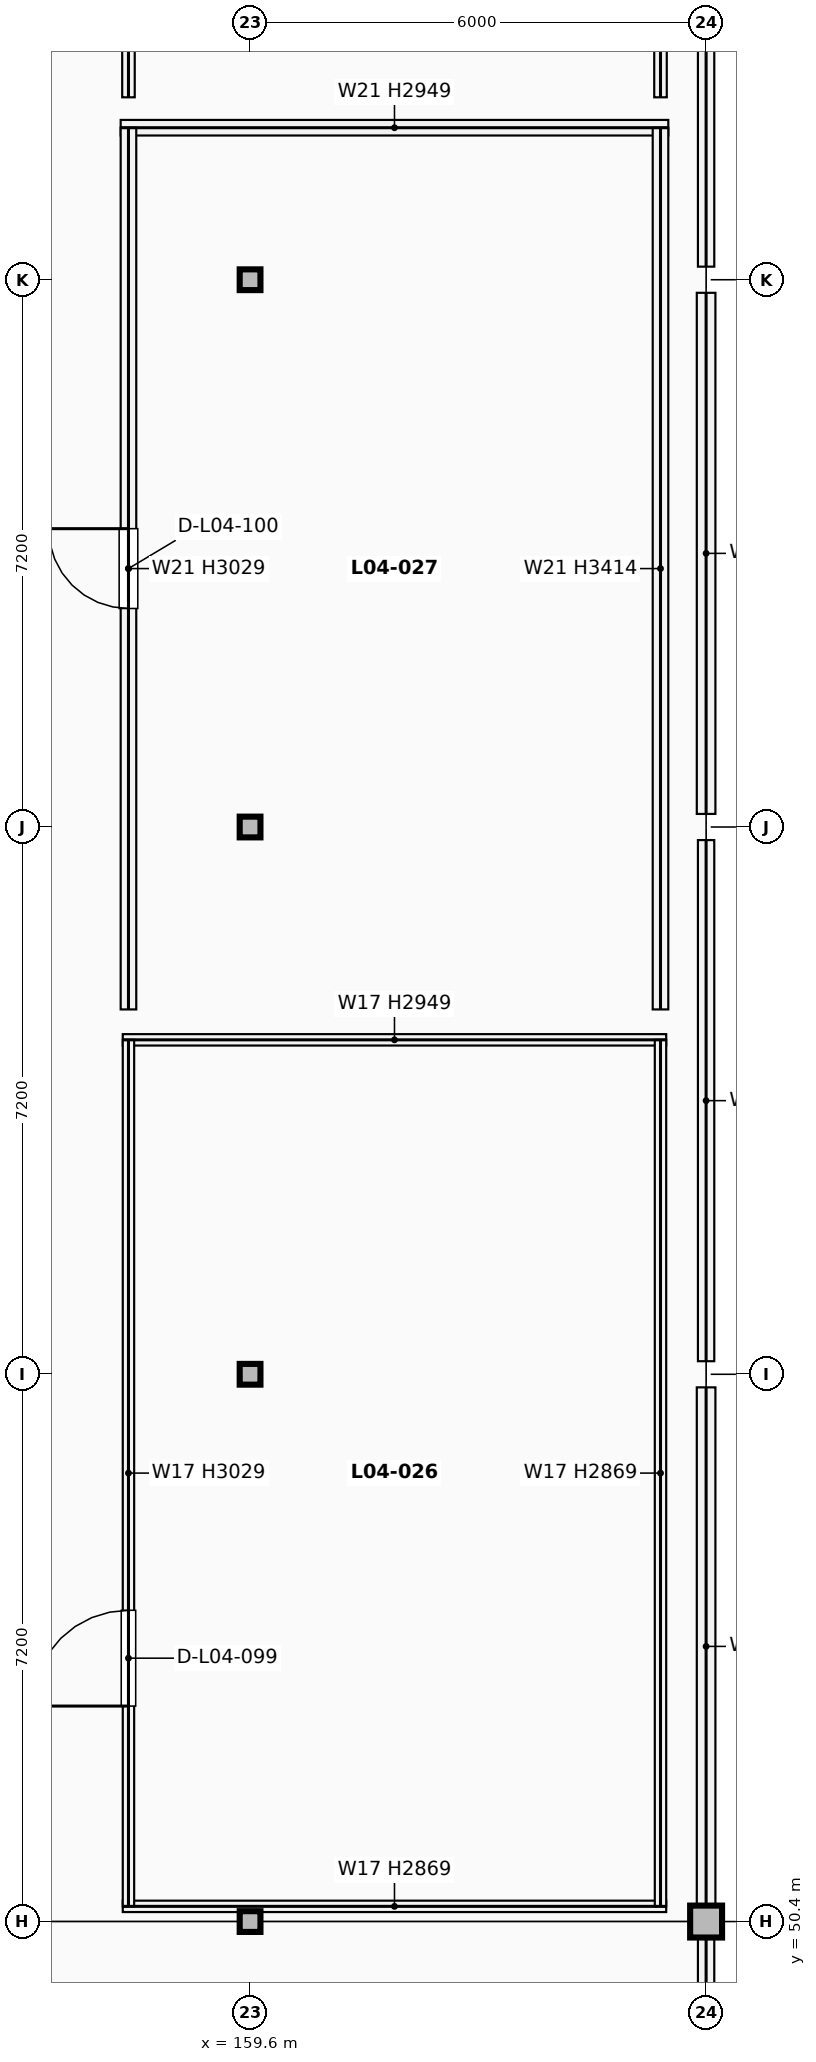
"""IFC4 building model, lengths in metres.
Left out: names, types, materials, properties, quantities, classifications, styles, units other than length and angle.
Written with IfcOpenShell. Run it as: python <this file> out.ifc"""

import sys

from ifc_helpers import new_model, si_unit, direction, frame, frame_2d, origin, origin_2d, place, context, subcontext, project, spatial, rectangle, hollow_circle, extrude, element, fill, save


model = new_model("IFC4")
c1 = context("Model", 3, precision=1e-05, world=origin(), true_north=direction((0.0, 1.0)))
c2 = subcontext(c1, "Body", "Model", "MODEL_VIEW")
j1 = project(units=[si_unit("LENGTHUNIT", "METRE"), si_unit("PLANEANGLEUNIT", "RADIAN")], contexts=[c1])
p1 = place(None, origin())
s1 = spatial("IfcSite", under=j1, at=p1, CompositionType="ELEMENT")
p2 = place(p1, origin())
s2 = spatial("IfcBuilding", under=s1, at=p2, CompositionType="ELEMENT")
p3 = place(p2, frame((0.0, 0.0, 17.34)))
s3 = spatial("IfcBuildingStorey", under=s2, at=p3, CompositionType="ELEMENT", Elevation=17.34)
for number, where, z_axis, x_axis in (
    (1, (159.6, 50.4, 0.0), (0.0, 0.0, 1.0), (1.0, 0.0, 0.0)),
    (2, (159.6, 57.6, 0.0), (0.0, 0.0, 1.0), (1.0, 0.0, 0.0)),
    (3, (159.6, 64.8, 0.0), (0.0, 0.0, 1.0), (1.0, 0.0, 0.0)),
    (4, (159.6, 72.0, 0.0), (0.0, 0.0, 1.0), (1.0, 0.0, 0.0)),
):
    element("IfcColumn", number, at=place(p3, frame(where, z_axis=z_axis, x_axis=x_axis)), inside=s3, PredefinedType="COLUMN", context=c2, shape_type="SweptSolid", body=[
        extrude(hollow_circle(Radius=0.136, WallThickness=0.012, at=origin_2d()), origin(), (0.0, 0.0, 1.0), 3.7),
    ])
p4 = place(p3, frame((165.6, 50.4, 0.0), z_axis=(0.0, 0.0, 1.0), x_axis=(1.0, 0.0, 0.0)))
e5 = element("IfcColumn", 5, at=p4, inside=s3, PredefinedType="COLUMN", context=c2, shape_type="SweptSolid", body=[
    extrude(rectangle(XDim=0.42, YDim=0.42, at=origin_2d()), origin(), (0.0, 0.0, 1.0), 3.74),
])
p5 = place(p3, frame((165.6, 44.612, 0.0), z_axis=(0.0, 0.0, 1.0), x_axis=(0.0, 1.0, 0.0)))
e6 = element("IfcWall", 6, at=p5, inside=s3, PredefinedType="SOLIDWALL", context=c2, shape_type="SweptSolid", body=[
    extrude(rectangle(XDim=5.576, YDim=0.215, at=frame_2d((2.788, 0.0))), origin(), (0.0, 0.0, 1.0), 2.869),
])
p6 = place(p3, frame((165.6, 50.612, 0.0), z_axis=(0.0, 0.0, 1.0), x_axis=(0.0, 1.0, 0.0)))
e7 = element("IfcWall", 7, at=p6, inside=s3, PredefinedType="SOLIDWALL", context=c2, shape_type="SweptSolid", body=[
    extrude(rectangle(XDim=6.816, YDim=0.245, at=frame_2d((3.408, 0.0))), origin(), (0.0, 0.0, 1.0), 2.869),
])
p7 = place(p3, frame((165.6, 57.772, 0.0), z_axis=(0.0, 0.0, 1.0), x_axis=(0.0, 1.0, 0.0)))
e8 = element("IfcWall", 8, at=p7, inside=s3, PredefinedType="SOLIDWALL", context=c2, shape_type="SweptSolid", body=[
    extrude(rectangle(XDim=6.856, YDim=0.215, at=frame_2d((3.428, 0.0))), origin(), (0.0, 0.0, 1.0), 3.129),
])
p8 = place(p3, frame((165.6, 64.972, 0.0), z_axis=(0.0, 0.0, 1.0), x_axis=(0.0, 1.0, 0.0)))
e9 = element("IfcWall", 9, at=p8, inside=s3, PredefinedType="SOLIDWALL", context=c2, shape_type="SweptSolid", body=[
    extrude(rectangle(XDim=6.856, YDim=0.245, at=frame_2d((3.428, 0.0))), origin(), (0.0, 0.0, 1.0), 3.129),
])
p9 = place(p3, frame((165.6, 72.172, 0.0), z_axis=(0.0, 0.0, 1.0), x_axis=(0.0, 1.0, 0.0)))
e10 = element("IfcWall", 10, at=p9, inside=s3, PredefinedType="SOLIDWALL", context=c2, shape_type="SweptSolid", body=[
    extrude(rectangle(XDim=6.816, YDim=0.215, at=frame_2d((3.408, 0.0))), origin(), (0.0, 0.0, 1.0), 2.869),
])
p10 = place(p3, frame((157.925, 50.6, 0.0), z_axis=(0.0, 0.0, 1.0), x_axis=(1.0, 0.0, 0.0)))
e11 = element("IfcWall", 11, at=p10, inside=s3, PredefinedType="PARTITIONING", context=c2, shape_type="SweptSolid", body=[
    extrude(rectangle(XDim=7.15, YDim=0.15, at=frame_2d((3.575, 0.0))), origin(), (0.0, 0.0, 1.0), 2.869),
])
p11 = place(p3, frame((157.925, 62.0, 0.0), z_axis=(0.0, 0.0, 1.0), x_axis=(1.0, 0.0, 0.0)))
e12 = element("IfcWall", 12, at=p11, inside=s3, PredefinedType="PARTITIONING", context=c2, shape_type="SweptSolid", body=[
    extrude(rectangle(XDim=7.15, YDim=0.15, at=frame_2d((3.575, 0.0))), origin(), (0.0, 0.0, 1.0), 2.949),
])
p12 = place(p3, frame((158.0, 50.6, 0.0), z_axis=(0.0, 0.0, 1.0), x_axis=(0.0, 1.0, 0.0)))
e13 = element("IfcWall", 13, at=p12, inside=s3, PredefinedType="PARTITIONING", context=c2, shape_type="SweptSolid", body=[
    extrude(rectangle(XDim=11.4, YDim=0.15, at=frame_2d((5.7, 0.0))), origin(), (0.0, 0.0, 1.0), 3.029),
])
p13 = place(p12, frame((2.635, 0.0, 0.0)))
e14 = element("IfcOpeningElement", 14, at=p13, cuts=e13, PredefinedType="OPENING", context=c2, shape_type="SweptSolid", body=[
    extrude(rectangle(XDim=1.26, YDim=2.26, at=frame_2d((0.63, 1.13))), frame((0.0, 0.085, 0.0), z_axis=(0.0, -1.0, 0.0), x_axis=(1.0, 0.0, 0.0)), (0.0, 0.0, 1.0), 0.17),
])
p14 = place(p3, frame((165.0, 50.6, 0.0), z_axis=(0.0, 0.0, 1.0), x_axis=(0.0, 1.0, 0.0)))
e15 = element("IfcWall", 15, at=p14, inside=s3, PredefinedType="PARTITIONING", context=c2, shape_type="SweptSolid", body=[
    extrude(rectangle(XDim=11.4, YDim=0.15, at=frame_2d((5.7, 0.0))), origin(), (0.0, 0.0, 1.0), 2.869),
])
p15 = place(p3, frame((157.897, 74.0, 0.0), z_axis=(0.0, 0.0, 1.0), x_axis=(1.0, 0.0, 0.0)))
e16 = element("IfcWall", 16, at=p15, inside=s3, PredefinedType="PARTITIONING", context=c2, shape_type="SweptSolid", body=[
    extrude(rectangle(XDim=7.205, YDim=0.205, at=frame_2d((3.603, 0.0))), origin(), (0.0, 0.0, 1.0), 2.949),
])
p16 = place(p3, frame((158.0, 62.4, 0.0), z_axis=(0.0, 0.0, 1.0), x_axis=(0.0, 1.0, 0.0)))
e17 = element("IfcWall", 17, at=p16, inside=s3, PredefinedType="PARTITIONING", context=c2, shape_type="SweptSolid", body=[
    extrude(rectangle(XDim=11.6, YDim=0.205, at=frame_2d((5.8, 0.0))), origin(), (0.0, 0.0, 1.0), 3.029),
])
p17 = place(p16, frame((5.275, 0.0, 0.0)))
e18 = element("IfcOpeningElement", 18, at=p17, cuts=e17, PredefinedType="OPENING", context=c2, shape_type="SweptSolid", body=[
    extrude(rectangle(XDim=1.05, YDim=2.15, at=frame_2d((0.525, 1.075))), frame((0.0, 0.113, 0.0), z_axis=(0.0, -1.0, 0.0), x_axis=(1.0, 0.0, 0.0)), (0.0, 0.0, 1.0), 0.225),
])
p18 = place(p3, frame((165.0, 62.4, 0.0), z_axis=(0.0, 0.0, 1.0), x_axis=(0.0, 1.0, 0.0)))
e19 = element("IfcWall", 19, at=p18, inside=s3, PredefinedType="PARTITIONING", context=c2, shape_type="SweptSolid", body=[
    extrude(rectangle(XDim=11.6, YDim=0.205, at=frame_2d((5.8, 0.0))), origin(), (0.0, 0.0, 1.0), 3.414),
])
p19 = place(p3, frame((158.0, 74.4, 0.0), z_axis=(0.0, 0.0, 1.0), x_axis=(0.0, 1.0, 0.0)))
e20 = element("IfcWall", 20, at=p19, inside=s3, PredefinedType="PARTITIONING", context=c2, shape_type="SweptSolid", body=[
    extrude(rectangle(XDim=7.4, YDim=0.165, at=frame_2d((3.7, 0.0))), origin(), (0.0, 0.0, 1.0), 3.029),
])
p20 = place(p19, frame((0.798, 0.0, 0.0)))
e21 = element("IfcOpeningElement", 21, at=p20, cuts=e20, PredefinedType="OPENING", context=c2, shape_type="SweptSolid", body=[
    extrude(rectangle(XDim=1.02, YDim=2.18, at=frame_2d((0.51, 1.09))), frame((0.0, 0.093, 0.0), z_axis=(0.0, -1.0, 0.0), x_axis=(1.0, 0.0, 0.0)), (0.0, 0.0, 1.0), 0.185),
])
p21 = place(p3, frame((165.0, 74.4, 0.0), z_axis=(0.0, 0.0, 1.0), x_axis=(0.0, 1.0, 0.0)))
e22 = element("IfcWall", 22, at=p21, inside=s3, PredefinedType="PARTITIONING", context=c2, shape_type="SweptSolid", body=[
    extrude(rectangle(XDim=7.4, YDim=0.165, at=frame_2d((3.7, 0.0))), origin(), (0.0, 0.0, 1.0), 2.869),
])
p22 = place(p13, origin())
e23 = element("IfcDoor", 23, at=p22, inside=s3, OperationType="SINGLE_SWING_LEFT", PredefinedType="DOOR", context=c2, shape_type="SweptSolid", body=[
    extrude(rectangle(XDim=1.26, YDim=2.26, at=frame_2d((0.63, 1.13))), frame((0.0, 0.025, 0.0), z_axis=(0.0, -1.0, 0.0), x_axis=(1.0, 0.0, 0.0)), (0.0, 0.0, 1.0), 0.05),
])
fill(e14, e23)
p23 = place(p17, origin())
e24 = element("IfcDoor", 24, at=p23, inside=s3, OperationType="SINGLE_SWING_RIGHT", PredefinedType="DOOR", context=c2, shape_type="SweptSolid", body=[
    extrude(rectangle(XDim=1.05, YDim=2.15, at=frame_2d((0.525, 1.075))), frame((0.0, 0.025, 0.0), z_axis=(0.0, -1.0, 0.0), x_axis=(1.0, 0.0, 0.0)), (0.0, 0.0, 1.0), 0.05),
])
fill(e18, e24)
save(model, sys.argv[1])
